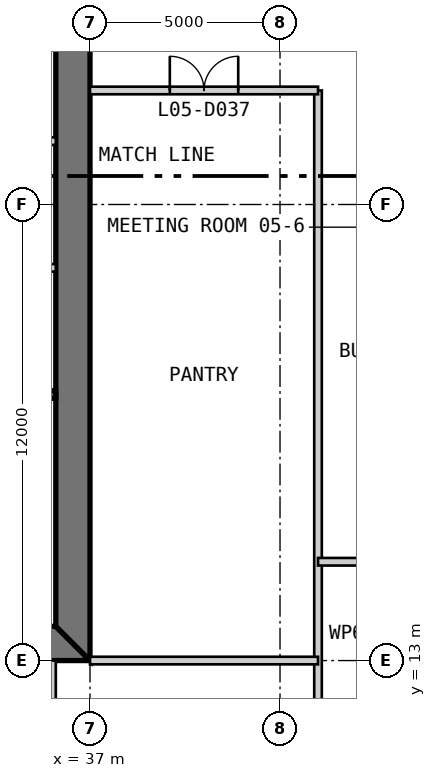
"""IFC4 building model, lengths in metres.
Left out: names, types, materials, properties, quantities, classifications, styles, units other than length and angle.
Written with IfcOpenShell. Run it as: python <this file> out.ifc"""

import sys

from ifc_helpers import new_model, si_unit, direction, frame, frame_2d, origin, place, context, subcontext, project, spatial, polyline, rectangle, outline, extrude, element, fill, save


model = new_model("IFC4")
c1 = context("Model", 3, precision=1e-05, world=origin(), true_north=direction((0.0, 1.0)))
c2 = subcontext(c1, "Body", "Model", "MODEL_VIEW")
j1 = project(units=[si_unit("LENGTHUNIT", "METRE"), si_unit("PLANEANGLEUNIT", "RADIAN")], contexts=[c1])
p1 = place(None, origin())
s1 = spatial("IfcSite", under=j1, at=p1, CompositionType="ELEMENT")
p2 = place(p1, origin())
s2 = spatial("IfcBuilding", under=s1, at=p2, CompositionType="ELEMENT")
p3 = place(p2, frame((0.0, 0.0, 26.2)))
s3 = spatial("IfcBuildingStorey", under=s2, at=p3, CompositionType="ELEMENT", Elevation=26.2)
p4 = place(p3, frame((13.0, 13.45, 0.0), z_axis=(0.0, 0.0, 1.0), x_axis=(1.0, 0.0, 0.0)))
e1 = element("IfcWall", 1, at=p4, inside=s3, PredefinedType="SHEAR", context=c2, shape_type="SweptSolid", body=[
    extrude(outline(polyline([(0.0, -0.45), (24.0, -0.45), (23.1, 0.45), (0.9, 0.45), (0.0, -0.45)])), origin(), (0.0, 0.0, 1.0), 4.8),
])
p5 = place(p4, frame((4.9, 0.0, 0.0)))
e2 = element("IfcOpeningElement", 2, at=p5, cuts=e1, PredefinedType="OPENING", context=c2, shape_type="SweptSolid", body=[
    extrude(rectangle(XDim=1.0, YDim=2.2, at=frame_2d((0.5, 1.1))), frame((0.0, 0.46, 0.0), z_axis=(0.0, -1.0, 0.0), x_axis=(1.0, 0.0, 0.0)), (0.0, 0.0, 1.0), 0.92),
])
p6 = place(p4, frame((8.9, 0.0, 0.0)))
e3 = element("IfcOpeningElement", 3, at=p6, cuts=e1, PredefinedType="OPENING", context=c2, shape_type="SweptSolid", body=[
    extrude(rectangle(XDim=1.1, YDim=2.2, at=frame_2d((0.55, 1.1))), frame((0.0, 0.46, 0.0), z_axis=(0.0, -1.0, 0.0), x_axis=(1.0, 0.0, 0.0)), (0.0, 0.0, 1.0), 0.92),
])
p7 = place(p4, frame((15.05, 0.0, 0.0)))
e4 = element("IfcOpeningElement", 4, at=p7, cuts=e1, PredefinedType="OPENING", context=c2, shape_type="SweptSolid", body=[
    extrude(rectangle(XDim=0.9, YDim=2.2, at=frame_2d((0.45, 1.1))), frame((0.0, 0.46, 0.0), z_axis=(0.0, -1.0, 0.0), x_axis=(1.0, 0.0, 0.0)), (0.0, 0.0, 1.0), 0.92),
])
p8 = place(p4, frame((17.9, 0.0, 0.0)))
e5 = element("IfcOpeningElement", 5, at=p8, cuts=e1, PredefinedType="OPENING", context=c2, shape_type="SweptSolid", body=[
    extrude(rectangle(XDim=1.0, YDim=2.2, at=frame_2d((0.5, 1.1))), frame((0.0, 0.46, 0.0), z_axis=(0.0, -1.0, 0.0), x_axis=(1.0, 0.0, 0.0)), (0.0, 0.0, 1.0), 0.92),
])
p9 = place(p4, frame((21.4, 0.0, 0.0)))
e6 = element("IfcOpeningElement", 6, at=p9, cuts=e1, PredefinedType="OPENING", context=c2, shape_type="SweptSolid", body=[
    extrude(rectangle(XDim=1.0, YDim=2.2, at=frame_2d((0.5, 1.1))), frame((0.0, 0.46, 0.0), z_axis=(0.0, -1.0, 0.0), x_axis=(1.0, 0.0, 0.0)), (0.0, 0.0, 1.0), 0.92),
])
p10 = place(p3, frame((36.55, 13.9, 0.0), z_axis=(0.0, 0.0, 1.0), x_axis=(0.0, 1.0, 0.0)))
e7 = element("IfcWall", 7, at=p10, inside=s3, PredefinedType="SHEAR", context=c2, shape_type="SweptSolid", body=[
    extrude(outline(polyline([(-0.9, -0.45), (23.1, -0.45), (22.2, 0.45), (0.0, 0.45), (-0.9, -0.45)])), origin(), (0.0, 0.0, 1.0), 4.8),
])
p11 = place(p10, frame((20.2, 0.0, 0.0)))
e8 = element("IfcOpeningElement", 8, at=p11, cuts=e7, PredefinedType="OPENING", context=c2, shape_type="SweptSolid", body=[
    extrude(rectangle(XDim=1.0, YDim=2.2, at=frame_2d((0.5, 1.1))), frame((0.0, 0.46, 0.0), z_axis=(0.0, -1.0, 0.0), x_axis=(1.0, 0.0, 0.0)), (0.0, 0.0, 1.0), 0.92),
])
p12 = place(p10, frame((17.25, 0.0, 0.0)))
e9 = element("IfcOpeningElement", 9, at=p12, cuts=e7, PredefinedType="OPENING", context=c2, shape_type="SweptSolid", body=[
    extrude(rectangle(XDim=0.9, YDim=2.2, at=frame_2d((0.45, 1.1))), frame((0.0, 0.46, 0.0), z_axis=(0.0, -1.0, 0.0), x_axis=(1.0, 0.0, 0.0)), (0.0, 0.0, 1.0), 0.92),
])
p13 = place(p3, frame((20.3, 20.0, 0.0), z_axis=(0.0, 0.0, 1.0), x_axis=(1.0, 0.0, 0.0)))
e10 = element("IfcWall", 10, at=p13, inside=s3, PredefinedType="SOLIDWALL", context=c2, shape_type="SweptSolid", body=[
    extrude(rectangle(XDim=15.8, YDim=0.2, at=frame_2d((7.9, 0.0))), origin(), (0.0, 0.0, 1.0), 4.6),
])
for number, where, z_axis, x_axis in (
    (11, (36.1, 26.667, 0.0), (0.0, 0.0, 1.0), (-1.0, 0.0, 0.0)),
    (12, (36.1, 23.333, 0.0), (0.0, 0.0, 1.0), (-1.0, 0.0, 0.0)),
):
    element("IfcWall", number, at=place(p3, frame(where, z_axis=z_axis, x_axis=x_axis)), inside=s3, PredefinedType="PARTITIONING", context=c2, shape_type="SweptSolid", body=[
        extrude(rectangle(XDim=2.8, YDim=0.2, at=frame_2d((1.4, 0.0))), origin(), (0.0, 0.0, 1.0), 4.6),
    ])
p14 = place(p3, frame((36.0, 7.0, 0.0), z_axis=(0.0, 0.0, 1.0), x_axis=(0.0, 1.0, 0.0)))
e13 = element("IfcWall", 13, at=p14, inside=s3, PredefinedType="PARTITIONING", context=c2, shape_type="SweptSolid", body=[
    extrude(rectangle(XDim=6.0, YDim=0.2, at=frame_2d((3.0, 0.0))), origin(), (0.0, 0.0, 1.0), 4.5),
])
p15 = place(p14, frame((3.3, 0.0, 0.0)))
e14 = element("IfcOpeningElement", 14, at=p15, cuts=e13, PredefinedType="OPENING", context=c2, shape_type="SweptSolid", body=[
    extrude(rectangle(XDim=0.9, YDim=2.2, at=frame_2d((0.45, 1.1))), frame((0.0, 0.11, 0.0), z_axis=(0.0, -1.0, 0.0), x_axis=(1.0, 0.0, 0.0)), (0.0, 0.0, 1.0), 0.22),
])
p16 = place(p3, frame((43.0, -0.6, 0.0), z_axis=(0.0, 0.0, 1.0), x_axis=(0.0, 1.0, 0.0)))
e15 = element("IfcWall", 15, at=p16, inside=s3, PredefinedType="PARTITIONING", context=c2, shape_type="SweptSolid", body=[
    extrude(rectangle(XDim=28.6, YDim=0.2, at=frame_2d((14.3, 0.0))), origin(), (0.0, 0.0, 1.0), 3.893),
])
p17 = place(p3, frame((37.0, 13.0, 0.0), z_axis=(0.0, 0.0, 1.0), x_axis=(1.0, 0.0, 0.0)))
e16 = element("IfcWall", 16, at=p17, inside=s3, PredefinedType="PARTITIONING", context=c2, shape_type="SweptSolid", body=[
    extrude(rectangle(XDim=6.0, YDim=0.2, at=frame_2d((3.0, 0.0))), origin(), (0.0, 0.0, 1.0), 3.703),
])
p18 = place(p3, frame((43.0, 15.6, 0.0), z_axis=(0.0, 0.0, 1.0), x_axis=(1.0, 0.0, 0.0)))
e17 = element("IfcWall", 17, at=p18, inside=s3, PredefinedType="PARTITIONING", context=c2, shape_type="SweptSolid", body=[
    extrude(rectangle(XDim=14.25, YDim=0.2, at=frame_2d((7.125, 0.0))), origin(), (0.0, 0.0, 1.0), 4.5),
])
p19 = place(p18, frame((10.0, 0.0, 0.0)))
e18 = element("IfcOpeningElement", 18, at=p19, cuts=e17, PredefinedType="OPENING", context=c2, shape_type="SweptSolid", body=[
    extrude(rectangle(XDim=1.8, YDim=2.4, at=frame_2d((0.9, 1.2))), frame((0.0, 0.11, 0.0), z_axis=(0.0, -1.0, 0.0), x_axis=(1.0, 0.0, 0.0)), (0.0, 0.0, 1.0), 0.22),
])
p20 = place(p18, frame((2.925, 0.0, 0.0)))
e19 = element("IfcOpeningElement", 19, at=p20, cuts=e17, PredefinedType="OPENING", context=c2, shape_type="SweptSolid", body=[
    extrude(rectangle(XDim=1.8, YDim=2.4, at=frame_2d((0.9, 1.2))), frame((0.0, 0.11, 0.0), z_axis=(0.0, -1.0, 0.0), x_axis=(1.0, 0.0, 0.0)), (0.0, 0.0, 1.0), 0.22),
])
p21 = place(p3, frame((37.0, 28.0, 0.0), z_axis=(0.0, 0.0, 1.0), x_axis=(1.0, 0.0, 0.0)))
e20 = element("IfcWall", 20, at=p21, inside=s3, PredefinedType="PARTITIONING", context=c2, shape_type="SweptSolid", body=[
    extrude(rectangle(XDim=6.0, YDim=0.2, at=frame_2d((3.0, 0.0))), origin(), (0.0, 0.0, 1.0), 4.5),
])
p22 = place(p21, frame((2.1, 0.0, 0.0)))
e21 = element("IfcOpeningElement", 21, at=p22, cuts=e20, PredefinedType="OPENING", context=c2, shape_type="SweptSolid", body=[
    extrude(rectangle(XDim=1.8, YDim=2.4, at=frame_2d((0.9, 1.2))), frame((0.0, 0.11, 0.0), z_axis=(0.0, -1.0, 0.0), x_axis=(1.0, 0.0, 0.0)), (0.0, 0.0, 1.0), 0.22),
])
p23 = place(p22, origin())
e22 = element("IfcDoor", 22, at=p23, inside=s3, OperationType="DOUBLE_DOOR_SINGLE_SWING", PredefinedType="DOOR", context=c2, shape_type="SweptSolid", body=[
    extrude(rectangle(XDim=1.8, YDim=2.4, at=frame_2d((0.9, 1.2))), frame((0.0, 0.025, 0.0), z_axis=(0.0, -1.0, 0.0), x_axis=(1.0, 0.0, 0.0)), (0.0, 0.0, 1.0), 0.05),
])
fill(e21, e22)
save(model, sys.argv[1])
